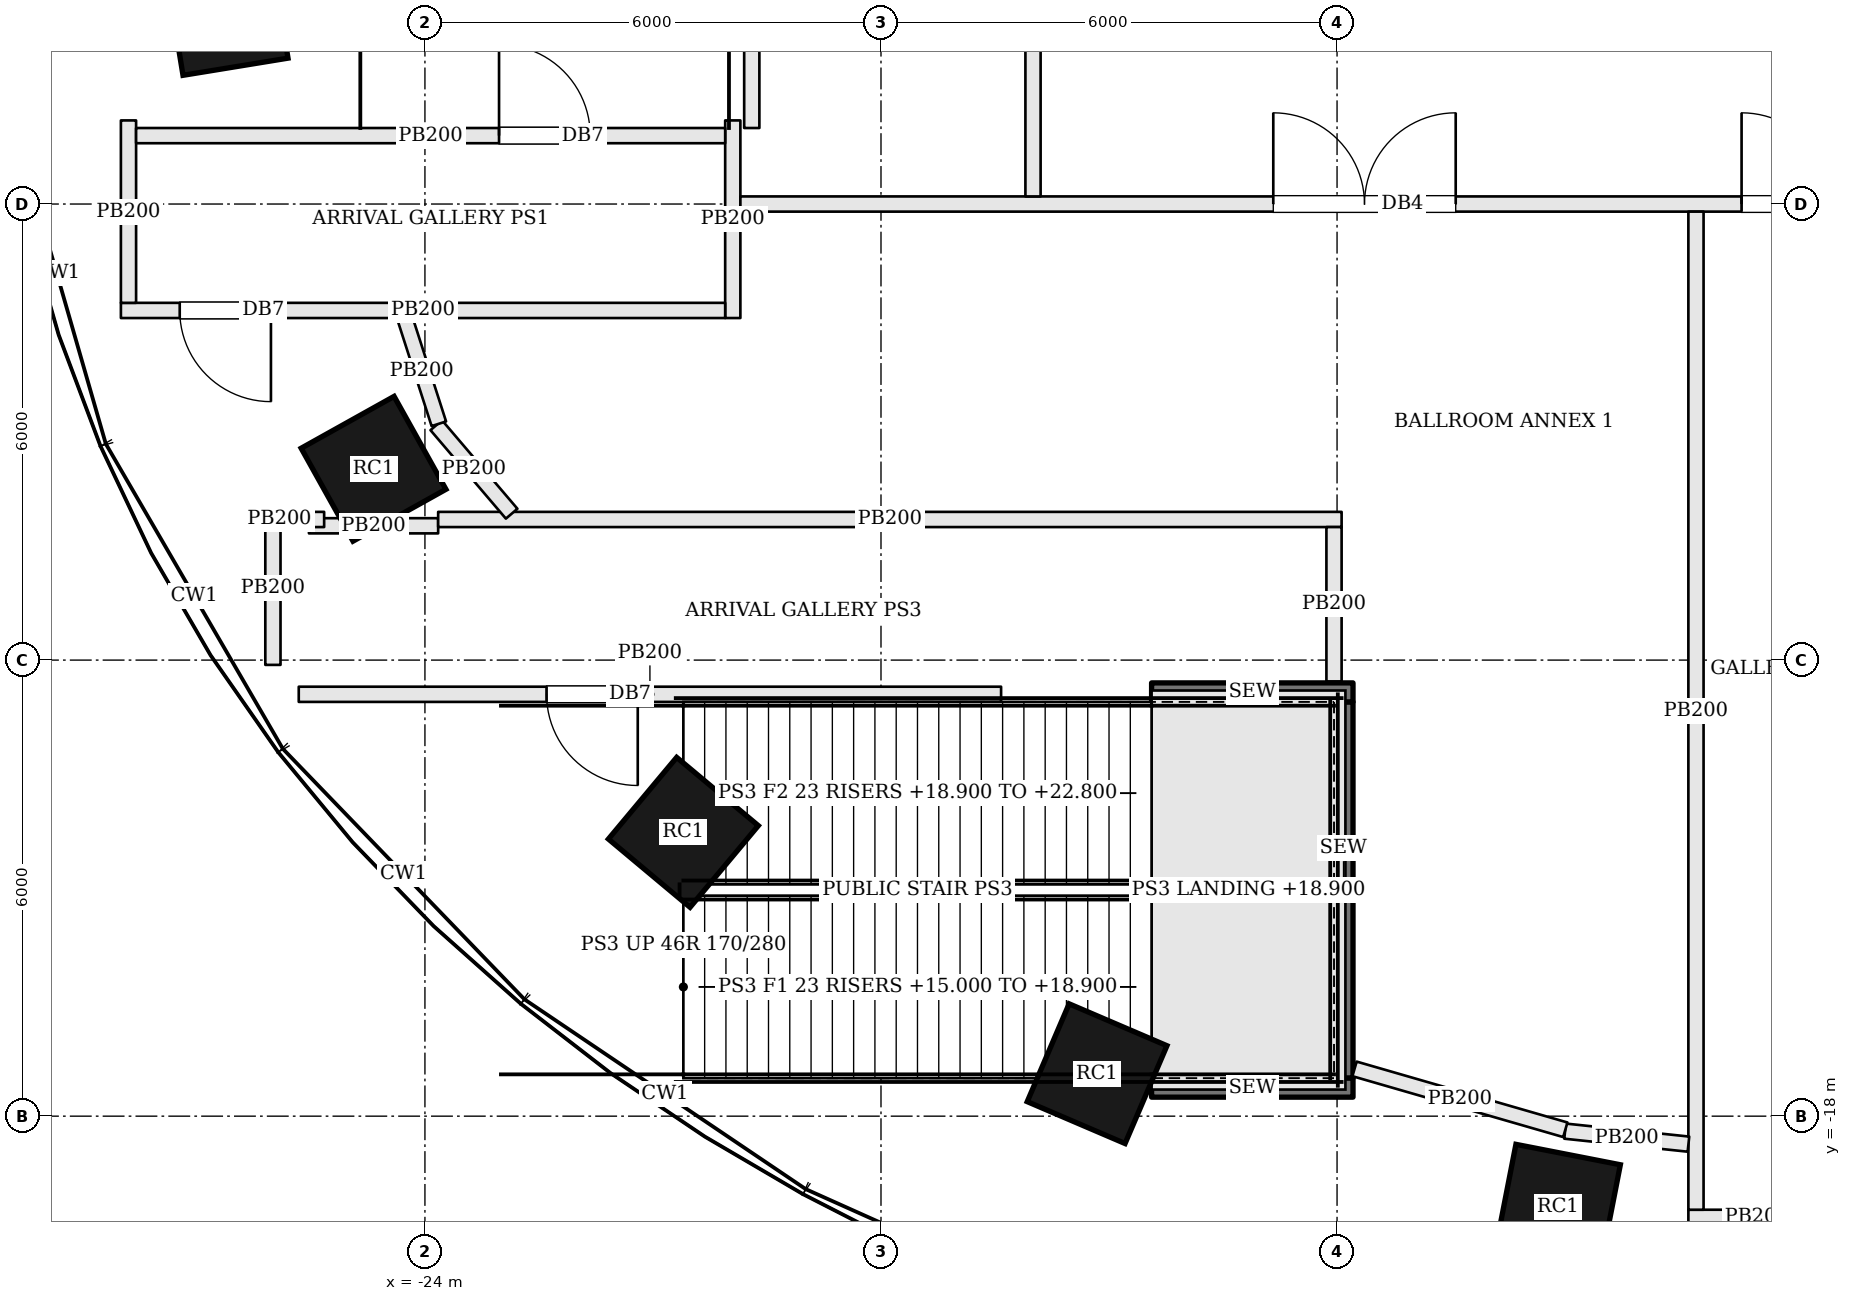
"""IFC4 building model, lengths in metres.
Left out: names, types, materials, properties, quantities, classifications, styles, units other than length and angle.
Written with IfcOpenShell. Run it as: python <this file> out.ifc"""

import sys

from ifc_helpers import new_model, si_unit, direction, frame, frame_2d, origin, origin_2d, place, context, subcontext, project, spatial, rectangle, extrude, element, fill, save


model = new_model("IFC4")
c1 = context("Model", 3, precision=1e-05, world=origin(), true_north=direction((0.0, 1.0)))
c2 = subcontext(c1, "Body", "Model", "MODEL_VIEW")
j1 = project(units=[si_unit("LENGTHUNIT", "METRE"), si_unit("PLANEANGLEUNIT", "RADIAN")], contexts=[c1])
p1 = place(None, origin())
s1 = spatial("IfcSite", under=j1, at=p1, CompositionType="ELEMENT")
p2 = place(p1, origin())
s2 = spatial("IfcBuilding", under=s1, at=p2, CompositionType="ELEMENT")
p3 = place(p2, frame((0.0, 0.0, 15.0)))
s3 = spatial("IfcBuildingStorey", under=s2, at=p3, CompositionType="ELEMENT", Elevation=15.0)
for number, where, z_axis, x_axis in (
    (1, (-26.605, -3.503, 0.0), (0.0, 0.0, 1.0), (0.161, -0.987, 0.0)),
    (2, (-24.676, -9.483, 0.0), (0.0, 0.0, 1.0), (0.487, -0.873, 0.0)),
    (3, (-20.6, -14.266, 0.0), (0.0, 0.0, 1.0), (0.767, -0.641, 0.0)),
    (4, (-15.157, -17.441, 0.0), (0.0, 0.0, 1.0), (0.919, -0.394, 0.0)),
    (5, (-9.094, -19.192, 0.0), (0.0, 0.0, 1.0), (0.981, -0.192, 0.0)),
):
    element("IfcColumn", number, at=place(p3, frame(where, z_axis=z_axis, x_axis=x_axis)), inside=s3, PredefinedType="COLUMN", context=c2, shape_type="SweptSolid", body=[
        extrude(rectangle(XDim=1.4, YDim=1.4, at=origin_2d()), origin(), (0.0, 0.0, 1.0), 7.8),
    ])
p4 = place(p3, frame((-19.95, -4.9, 0.0), z_axis=(0.0, 0.0, 1.0), x_axis=(0.0, -1.0, 0.0)))
e6 = element("IfcWall", 6, at=p4, inside=s3, PredefinedType="PARTITIONING", context=c2, shape_type="SweptSolid", body=[
    extrude(rectangle(XDim=2.6, YDim=0.2, at=frame_2d((1.3, 0.0))), origin(), (0.0, 0.0, 1.0), 6.83),
])
p5 = place(p3, frame((-20.05, -7.4, 0.0), z_axis=(0.0, 0.0, 1.0), x_axis=(-1.0, 0.0, 0.0)))
e7 = element("IfcWall", 7, at=p5, inside=s3, PredefinedType="PARTITIONING", context=c2, shape_type="SweptSolid", body=[
    extrude(rectangle(XDim=7.95, YDim=0.2, at=frame_2d((3.975, 0.0))), origin(), (0.0, 0.0, 1.0), 6.83),
])
p6 = place(p5, frame((5.976, 0.0, 0.0)))
e8 = element("IfcOpeningElement", 8, at=p6, cuts=e7, PredefinedType="OPENING", context=c2, shape_type="SweptSolid", body=[
    extrude(rectangle(XDim=1.2, YDim=2.1, at=frame_2d((0.6, 1.05))), frame((0.0, 0.11, 0.0), z_axis=(0.0, -1.0, 0.0), x_axis=(1.0, 0.0, 0.0)), (0.0, 0.0, 1.0), 0.22),
])
p7 = place(p3, frame((-27.9, -7.3, 0.0), z_axis=(0.0, 0.0, 1.0), x_axis=(0.0, 1.0, 0.0)))
e9 = element("IfcWall", 9, at=p7, inside=s3, PredefinedType="PARTITIONING", context=c2, shape_type="SweptSolid", body=[
    extrude(rectangle(XDim=2.4, YDim=0.2, at=frame_2d((1.2, 0.0))), origin(), (0.0, 0.0, 1.0), 6.83),
])
p8 = place(p3, frame((-27.8, -5.1, 0.0), z_axis=(0.0, 0.0, 1.0), x_axis=(1.0, 0.0, 0.0)))
e10 = element("IfcWall", 10, at=p8, inside=s3, PredefinedType="PARTITIONING", context=c2, shape_type="SweptSolid", body=[
    extrude(rectangle(XDim=7.75, YDim=0.2, at=frame_2d((3.875, 0.0))), origin(), (0.0, 0.0, 1.0), 6.83),
])
p9 = place(p8, frame((4.775, 0.0, 0.0)))
e11 = element("IfcOpeningElement", 11, at=p9, cuts=e10, PredefinedType="OPENING", context=c2, shape_type="SweptSolid", body=[
    extrude(rectangle(XDim=1.2, YDim=2.1, at=frame_2d((0.6, 1.05))), frame((0.0, 0.11, 0.0), z_axis=(0.0, -1.0, 0.0), x_axis=(1.0, 0.0, 0.0)), (0.0, 0.0, 1.0), 0.22),
])
p10 = place(p3, frame((-25.526, -10.233, 0.0), z_axis=(0.0, 0.0, 1.0), x_axis=(1.0, 0.0, 0.0)))
e12 = element("IfcWall", 12, at=p10, inside=s3, PredefinedType="PARTITIONING", context=c2, shape_type="SweptSolid", body=[
    extrude(rectangle(XDim=1.7, YDim=0.2, at=frame_2d((0.85, 0.0))), origin(), (0.0, 0.0, 1.0), 6.83),
])
p11 = place(p3, frame((-23.826, -10.15, 0.0), z_axis=(0.0, 0.0, 1.0), x_axis=(1.0, 0.0, 0.0)))
e13 = element("IfcWall", 13, at=p11, inside=s3, PredefinedType="PARTITIONING", context=c2, shape_type="SweptSolid", body=[
    extrude(rectangle(XDim=11.886, YDim=0.2, at=frame_2d((5.943, 0.0))), origin(), (0.0, 0.0, 1.0), 6.83),
])
p12 = place(p3, frame((-12.04, -10.25, 0.0), z_axis=(0.0, 0.0, 1.0), x_axis=(0.0, -1.0, 0.0)))
e14 = element("IfcWall", 14, at=p12, inside=s3, PredefinedType="PARTITIONING", context=c2, shape_type="SweptSolid", body=[
    extrude(rectangle(XDim=2.03, YDim=0.2, at=frame_2d((1.015, 0.0))), origin(), (0.0, 0.0, 1.0), 6.83),
])
p13 = place(p3, frame((-16.42, -12.45, 0.0), z_axis=(0.0, 0.0, 1.0), x_axis=(-1.0, 0.0, 0.0)))
e15 = element("IfcWall", 15, at=p13, inside=s3, PredefinedType="PARTITIONING", context=c2, shape_type="SweptSolid", body=[
    extrude(rectangle(XDim=9.24, YDim=0.2, at=frame_2d((4.62, 0.0))), origin(), (0.0, 0.0, 1.0), 6.83),
])
p14 = place(p13, frame((4.78, 0.0, 0.0)))
e16 = element("IfcOpeningElement", 16, at=p14, cuts=e15, PredefinedType="OPENING", context=c2, shape_type="SweptSolid", body=[
    extrude(rectangle(XDim=1.2, YDim=2.1, at=frame_2d((0.6, 1.05))), frame((0.0, 0.11, 0.0), z_axis=(0.0, -1.0, 0.0), x_axis=(1.0, 0.0, 0.0)), (0.0, 0.0, 1.0), 0.22),
])
p15 = place(p3, frame((-26.0, -12.063, 0.0), z_axis=(0.0, 0.0, 1.0), x_axis=(0.0, 1.0, 0.0)))
e17 = element("IfcWall", 17, at=p15, inside=s3, PredefinedType="PARTITIONING", context=c2, shape_type="SweptSolid", body=[
    extrude(rectangle(XDim=2.013, YDim=0.2, at=frame_2d((1.006, 0.0))), origin(), (0.0, 0.0, 1.0), 6.83),
])
p16 = place(p3, frame((-25.9, -10.15, 0.0), z_axis=(0.0, 0.0, 1.0), x_axis=(1.0, 0.0, 0.0)))
e18 = element("IfcWall", 18, at=p16, inside=s3, PredefinedType="PARTITIONING", context=c2, shape_type="SweptSolid", body=[
    extrude(rectangle(XDim=0.574, YDim=0.2, at=frame_2d((0.287, 0.0))), origin(), (0.0, 0.0, 1.0), 6.83),
])
p17 = place(p3, frame((-19.85, -6.0, 0.0), z_axis=(0.0, 0.0, 1.0), x_axis=(1.0, 0.0, 0.0)))
e19 = element("IfcWall", 19, at=p17, inside=s3, PredefinedType="PARTITIONING", context=c2, shape_type="SweptSolid", body=[
    extrude(rectangle(XDim=39.7, YDim=0.2, at=frame_2d((19.85, 0.0))), origin(), (0.0, 0.0, 1.0), 6.83),
])
p18 = place(p17, frame((13.172, 0.0, 0.0)))
e20 = element("IfcOpeningElement", 20, at=p18, cuts=e19, PredefinedType="OPENING", context=c2, shape_type="SweptSolid", body=[
    extrude(rectangle(XDim=1.2, YDim=2.1, at=frame_2d((0.6, 1.05))), frame((0.0, 0.11, 0.0), z_axis=(0.0, -1.0, 0.0), x_axis=(1.0, 0.0, 0.0)), (0.0, 0.0, 1.0), 0.22),
])
p19 = place(p17, frame((24.211, 0.0, 0.0)))
e21 = element("IfcOpeningElement", 21, at=p19, cuts=e19, PredefinedType="OPENING", context=c2, shape_type="SweptSolid", body=[
    extrude(rectangle(XDim=2.4, YDim=2.4, at=frame_2d((1.2, 1.2))), frame((0.0, 0.11, 0.0), z_axis=(0.0, -1.0, 0.0), x_axis=(1.0, 0.0, 0.0)), (0.0, 0.0, 1.0), 0.22),
])
p20 = place(p17, frame((7.011, 0.0, 0.0)))
e22 = element("IfcOpeningElement", 22, at=p20, cuts=e19, PredefinedType="OPENING", context=c2, shape_type="SweptSolid", body=[
    extrude(rectangle(XDim=2.4, YDim=2.4, at=frame_2d((1.2, 1.2))), frame((0.0, 0.11, 0.0), z_axis=(0.0, -1.0, 0.0), x_axis=(1.0, 0.0, 0.0)), (0.0, 0.0, 1.0), 0.22),
])
p21 = place(p3, frame((-4.978, -19.331, 0.0), z_axis=(0.0, 0.0, 1.0), x_axis=(-1.0, 0.0, 0.0)))
e23 = element("IfcWall", 23, at=p21, inside=s3, PredefinedType="PARTITIONING", context=c2, shape_type="SweptSolid", body=[
    extrude(rectangle(XDim=2.4, YDim=0.2, at=frame_2d((1.2, 0.0))), origin(), (0.0, 0.0, 1.0), 6.83),
])
p22 = place(p21, frame((0.5, 0.0, 0.0)))
e24 = element("IfcOpeningElement", 24, at=p22, cuts=e23, PredefinedType="OPENING", context=c2, shape_type="SweptSolid", body=[
    extrude(rectangle(XDim=1.2, YDim=2.1, at=frame_2d((0.6, 1.05))), frame((0.0, 0.11, 0.0), z_axis=(0.0, -1.0, 0.0), x_axis=(1.0, 0.0, 0.0)), (0.0, 0.0, 1.0), 0.22),
])
p23 = place(p3, frame((-7.278, -19.231, 0.0), z_axis=(0.0, 0.0, 1.0), x_axis=(0.0, 1.0, 0.0)))
e25 = element("IfcWall", 25, at=p23, inside=s3, PredefinedType="PARTITIONING", context=c2, shape_type="SweptSolid", body=[
    extrude(rectangle(XDim=13.131, YDim=0.2, at=frame_2d((6.565, 0.0))), origin(), (0.0, 0.0, 1.0), 6.83),
])
p24 = place(p3, frame((-19.7, -5.0, 0.0), z_axis=(0.0, 0.0, 1.0), x_axis=(0.0, 1.0, 0.0)))
e26 = element("IfcWall", 26, at=p24, inside=s3, PredefinedType="PARTITIONING", context=c2, shape_type="SweptSolid", body=[
    extrude(rectangle(XDim=6.58, YDim=0.2, at=frame_2d((3.29, 0.0))), origin(), (0.0, 0.0, 1.0), 6.934),
])
p25 = place(p3, frame((-16.0, 14.9, 0.0), z_axis=(0.0, 0.0, 1.0), x_axis=(0.0, -1.0, 0.0)))
e27 = element("IfcWall", 27, at=p25, inside=s3, PredefinedType="PARTITIONING", context=c2, shape_type="SweptSolid", body=[
    extrude(rectangle(XDim=20.8, YDim=0.2, at=frame_2d((10.4, 0.0))), origin(), (0.0, 0.0, 1.0), 6.83),
])
p26 = place(p25, frame((9.9, 0.0, 0.0)))
e28 = element("IfcOpeningElement", 28, at=p26, cuts=e27, PredefinedType="OPENING", context=c2, shape_type="SweptSolid", body=[
    extrude(rectangle(XDim=1.0, YDim=2.1, at=frame_2d((0.5, 1.05))), frame((0.0, 0.11, 0.0), z_axis=(0.0, -1.0, 0.0), x_axis=(1.0, 0.0, 0.0)), (0.0, 0.0, 1.0), 0.22),
])
p27 = place(p3, frame((-7.377, -18.368, 0.0), z_axis=(0.0, 0.0, 1.0), x_axis=(-0.994502173657, 0.104715932846, 0.0)))
e29 = element("IfcWall", 29, at=p27, inside=s3, PredefinedType="PARTITIONING", context=c2, shape_type="SweptSolid", body=[
    extrude(rectangle(XDim=1.632, YDim=0.2, at=frame_2d((0.816, 0.0))), origin(), (0.0, 0.0, 1.0), 6.83),
])
p28 = place(p3, frame((-8.997, -18.179, 0.0), z_axis=(0.0, 0.0, 1.0), x_axis=(-0.960718693411, 0.277524038834, 0.0)))
e30 = element("IfcWall", 30, at=p28, inside=s3, PredefinedType="PARTITIONING", context=c2, shape_type="SweptSolid", body=[
    extrude(rectangle(XDim=2.886, YDim=0.2, at=frame_2d((1.443, 0.0))), origin(), (0.0, 0.0, 1.0), 6.83),
])
p29 = place(p3, frame((-22.859, -10.074, 0.0), z_axis=(0.0, 0.0, 1.0), x_axis=(-0.648685680777, 0.761056428628, 0.0)))
e31 = element("IfcWall", 31, at=p29, inside=s3, PredefinedType="PARTITIONING", context=c2, shape_type="SweptSolid", body=[
    extrude(rectangle(XDim=1.53, YDim=0.2, at=frame_2d((0.765, 0.0))), origin(), (0.0, 0.0, 1.0), 6.83),
])
p30 = place(p3, frame((-23.817, -8.891, 0.0), z_axis=(0.0, 0.0, 1.0), x_axis=(-0.306321721395, 0.951928045076, 0.0)))
e32 = element("IfcWall", 32, at=p30, inside=s3, PredefinedType="PARTITIONING", context=c2, shape_type="SweptSolid", body=[
    extrude(rectangle(XDim=1.467, YDim=0.2, at=frame_2d((0.733, 0.0))), origin(), (0.0, 0.0, 1.0), 6.83),
])
p31 = place(p3, frame((-11.915, -17.5, 0.0), z_axis=(0.0, 0.0, 1.0), x_axis=(0.0, 1.0, 0.0)))
e33 = element("IfcWall", 33, at=p31, inside=s3, PredefinedType="SOLIDWALL", context=c2, shape_type="SweptSolid", body=[
    extrude(rectangle(XDim=4.95, YDim=0.25, at=frame_2d((2.475, 0.0))), origin(), (0.0, 0.0, 1.0), 7.55),
])
for number, where, z_axis, x_axis in (
    (34, (-14.44, -17.625, 0.0), (0.0, 0.0, 1.0), (1.0, 0.0, 0.0)),
    (35, (-14.44, -12.425, 0.0), (0.0, 0.0, 1.0), (1.0, 0.0, 0.0)),
):
    element("IfcWall", number, at=place(p3, frame(where, z_axis=z_axis, x_axis=x_axis)), inside=s3, PredefinedType="SOLIDWALL", context=c2, shape_type="SweptSolid", body=[
        extrude(rectangle(XDim=2.65, YDim=0.25, at=frame_2d((1.325, 0.0))), origin(), (0.0, 0.0, 1.0), 7.55),
    ])
p32 = place(p18, origin())
e36 = element("IfcDoor", 36, at=p32, inside=s3, OperationType="SINGLE_SWING_LEFT", PredefinedType="DOOR", context=c2, shape_type="SweptSolid", body=[
    extrude(rectangle(XDim=1.2, YDim=2.1, at=frame_2d((0.6, 1.05))), frame((0.0, 0.025, 0.0), z_axis=(0.0, -1.0, 0.0), x_axis=(1.0, 0.0, 0.0)), (0.0, 0.0, 1.0), 0.05),
])
fill(e20, e36)
p33 = place(p22, origin())
e37 = element("IfcDoor", 37, at=p33, inside=s3, OperationType="SINGLE_SWING_LEFT", PredefinedType="DOOR", context=c2, shape_type="SweptSolid", body=[
    extrude(rectangle(XDim=1.2, YDim=2.1, at=frame_2d((0.6, 1.05))), frame((0.0, 0.025, 0.0), z_axis=(0.0, -1.0, 0.0), x_axis=(1.0, 0.0, 0.0)), (0.0, 0.0, 1.0), 0.05),
])
fill(e24, e37)
p34 = place(p9, origin())
e38 = element("IfcDoor", 38, at=p34, inside=s3, OperationType="SINGLE_SWING_LEFT", PredefinedType="DOOR", context=c2, shape_type="SweptSolid", body=[
    extrude(rectangle(XDim=1.2, YDim=2.1, at=frame_2d((0.6, 1.05))), frame((0.0, 0.025, 0.0), z_axis=(0.0, -1.0, 0.0), x_axis=(1.0, 0.0, 0.0)), (0.0, 0.0, 1.0), 0.05),
])
fill(e11, e38)
p35 = place(p6, origin())
e39 = element("IfcDoor", 39, at=p35, inside=s3, OperationType="SINGLE_SWING_LEFT", PredefinedType="DOOR", context=c2, shape_type="SweptSolid", body=[
    extrude(rectangle(XDim=1.2, YDim=2.1, at=frame_2d((0.6, 1.05))), frame((0.0, 0.025, 0.0), z_axis=(0.0, -1.0, 0.0), x_axis=(1.0, 0.0, 0.0)), (0.0, 0.0, 1.0), 0.05),
])
fill(e8, e39)
p36 = place(p14, origin())
e40 = element("IfcDoor", 40, at=p36, inside=s3, OperationType="SINGLE_SWING_LEFT", PredefinedType="DOOR", context=c2, shape_type="SweptSolid", body=[
    extrude(rectangle(XDim=1.2, YDim=2.1, at=frame_2d((0.6, 1.05))), frame((0.0, 0.025, 0.0), z_axis=(0.0, -1.0, 0.0), x_axis=(1.0, 0.0, 0.0)), (0.0, 0.0, 1.0), 0.05),
])
fill(e16, e40)
p37 = place(p20, origin())
e41 = element("IfcDoor", 41, at=p37, inside=s3, OperationType="DOUBLE_DOOR_SINGLE_SWING", PredefinedType="DOOR", context=c2, shape_type="SweptSolid", body=[
    extrude(rectangle(XDim=2.4, YDim=2.4, at=frame_2d((1.2, 1.2))), frame((0.0, 0.025, 0.0), z_axis=(0.0, -1.0, 0.0), x_axis=(1.0, 0.0, 0.0)), (0.0, 0.0, 1.0), 0.05),
])
fill(e22, e41)
save(model, sys.argv[1])
